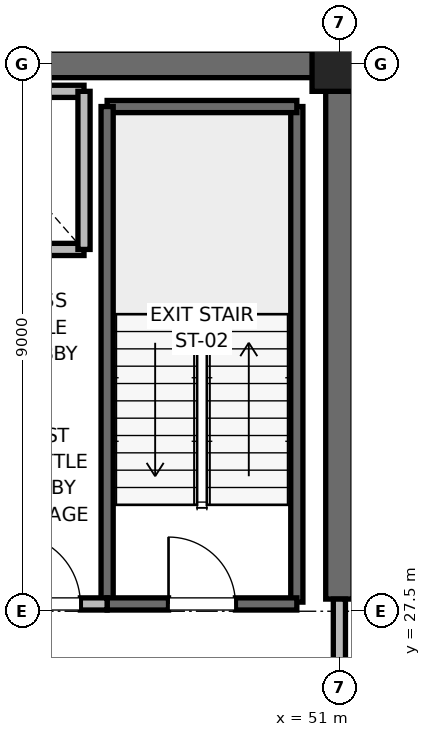
"""IFC4 building model, lengths in metres.
Left out: names, types, materials, properties, quantities, classifications, styles, units other than length and angle.
Written with IfcOpenShell. Run it as: python <this file> out.ifc"""

import sys

from ifc_helpers import new_model, si_unit, direction, frame, frame_2d, origin, origin_2d, place, context, subcontext, project, spatial, rectangle, extrude, element, fill, save


model = new_model("IFC4")
c1 = context("Model", 3, precision=1e-05, world=origin(), true_north=direction((0.0, 1.0)))
c2 = subcontext(c1, "Body", "Model", "MODEL_VIEW")
j1 = project(units=[si_unit("LENGTHUNIT", "METRE"), si_unit("PLANEANGLEUNIT", "RADIAN")], contexts=[c1])
p1 = place(None, origin())
s1 = spatial("IfcSite", under=j1, at=p1, CompositionType="ELEMENT")
p2 = place(p1, origin())
s2 = spatial("IfcBuilding", under=s1, at=p2, CompositionType="ELEMENT")
p3 = place(p2, frame((0.0, 0.0, 267.2)))
s3 = spatial("IfcBuildingStorey", under=s2, at=p3, CompositionType="ELEMENT", Elevation=267.2)
p4 = place(p3, frame((51.0, 36.5, 0.0), z_axis=(0.0, 0.0, 1.0), x_axis=(1.0, 0.0, 0.0)))
e1 = element("IfcColumn", 1, at=p4, inside=s3, PredefinedType="PILASTER", context=c2, shape_type="SweptSolid", body=[
    extrude(rectangle(XDim=0.9, YDim=0.9, at=origin_2d()), origin(), (0.0, 0.0, 1.0), 4.0),
])
p5 = place(p3, frame((45.2, 36.5, 0.0), z_axis=(0.0, 0.0, 1.0), x_axis=(1.0, 0.0, 0.0)))
e2 = element("IfcWall", 2, at=p5, inside=s3, PredefinedType="SHEAR", context=c2, shape_type="SweptSolid", body=[
    extrude(rectangle(XDim=5.8, YDim=0.45, at=frame_2d((2.9, 0.0))), origin(), (0.0, 0.0, 1.0), 3.785),
])
p6 = place(p3, frame((51.0, 27.7, 0.0), z_axis=(0.0, 0.0, 1.0), x_axis=(0.0, 1.0, 0.0)))
e3 = element("IfcWall", 3, at=p6, inside=s3, PredefinedType="SHEAR", context=c2, shape_type="SweptSolid", body=[
    extrude(rectangle(XDim=8.8, YDim=0.45, at=frame_2d((4.4, 0.0))), origin(), (0.0, 0.0, 1.0), 3.785),
])
p7 = place(p3, frame((50.3, 27.65, 0.0), z_axis=(0.0, 0.0, 1.0), x_axis=(0.0, 1.0, 0.0)))
e4 = element("IfcWall", 4, at=p7, inside=s3, PredefinedType="SOLIDWALL", context=c2, shape_type="SweptSolid", body=[
    extrude(rectangle(XDim=8.15, YDim=0.2, at=frame_2d((4.075, 0.0))), origin(), (0.0, 0.0, 1.0), 3.785),
])
p8 = place(p3, frame((47.18, 35.8, 0.0), z_axis=(0.0, 0.0, 1.0), x_axis=(1.0, 0.0, 0.0)))
e5 = element("IfcWall", 5, at=p8, inside=s3, PredefinedType="SOLIDWALL", context=c2, shape_type="SweptSolid", body=[
    extrude(rectangle(XDim=3.12, YDim=0.2, at=frame_2d((1.56, 0.0))), origin(), (0.0, 0.0, 1.0), 3.785),
])
p9 = place(p3, frame((47.18, 27.62, 0.0), z_axis=(0.0, 0.0, 1.0), x_axis=(0.0, 1.0, 0.0)))
e6 = element("IfcWall", 6, at=p9, inside=s3, PredefinedType="SOLIDWALL", context=c2, shape_type="SweptSolid", body=[
    extrude(rectangle(XDim=8.18, YDim=0.2, at=frame_2d((4.09, 0.0))), origin(), (0.0, 0.0, 1.0), 3.785),
])
p10 = place(p3, frame((47.18, 27.62, 0.0), z_axis=(0.0, 0.0, 1.0), x_axis=(1.0, 0.0, 0.0)))
e7 = element("IfcWall", 7, at=p10, inside=s3, PredefinedType="SOLIDWALL", context=c2, shape_type="SweptSolid", body=[
    extrude(rectangle(XDim=3.12, YDim=0.2, at=frame_2d((1.56, 0.0))), origin(), (0.0, 0.0, 1.0), 3.785),
])
p11 = place(p10, frame((1.01, 0.0, 0.0)))
e8 = element("IfcOpeningElement", 8, at=p11, cuts=e7, PredefinedType="OPENING", context=c2, shape_type="SweptSolid", body=[
    extrude(rectangle(XDim=1.1, YDim=2.15, at=frame_2d((0.55, 1.075))), frame((0.0, 0.1, 0.0), z_axis=(0.0, -1.0, 0.0), x_axis=(1.0, 0.0, 0.0)), (0.0, 0.0, 1.0), 0.2),
])
p12 = place(p3, frame((45.15, 27.62, 0.0), z_axis=(0.0, 0.0, 1.0), x_axis=(1.0, 0.0, 0.0)))
e9 = element("IfcWall", 9, at=p12, inside=s3, PredefinedType="PARTITIONING", context=c2, shape_type="SweptSolid", body=[
    extrude(rectangle(XDim=2.03, YDim=0.2, at=frame_2d((1.015, 0.0))), origin(), (0.0, 0.0, 1.0), 3.785),
])
p13 = place(p12, frame((0.44, 0.0, 0.0)))
e10 = element("IfcOpeningElement", 10, at=p13, cuts=e9, PredefinedType="OPENING", context=c2, shape_type="SweptSolid", body=[
    extrude(rectangle(XDim=1.15, YDim=2.2, at=frame_2d((0.575, 1.1))), frame((0.0, 0.1, 0.0), z_axis=(0.0, -1.0, 0.0), x_axis=(1.0, 0.0, 0.0)), (0.0, 0.0, 1.0), 0.2),
])
p14 = place(p3, frame((51.0, 24.3, 0.0), z_axis=(0.0, 0.0, 1.0), x_axis=(0.0, 1.0, 0.0)))
e11 = element("IfcWall", 11, at=p14, inside=s3, PredefinedType="PARTITIONING", context=c2, shape_type="SweptSolid", body=[
    extrude(rectangle(XDim=3.4, YDim=0.2, at=frame_2d((1.7, 0.0))), origin(), (0.0, 0.0, 1.0), 2.865),
])
p15 = place(p14, frame((1.125, 0.0, 0.0)))
e12 = element("IfcOpeningElement", 12, at=p15, cuts=e11, PredefinedType="OPENING", context=c2, shape_type="SweptSolid", body=[
    extrude(rectangle(XDim=1.15, YDim=2.2, at=frame_2d((0.575, 1.1))), frame((0.0, 0.1, 0.0), z_axis=(0.0, -1.0, 0.0), x_axis=(1.0, 0.0, 0.0)), (0.0, 0.0, 1.0), 0.2),
])
p16 = place(p3, frame((44.5, 33.45, 0.0), z_axis=(0.0, 0.0, 1.0), x_axis=(1.0, 0.0, 0.0)))
e13 = element("IfcWall", 13, at=p16, inside=s3, PredefinedType="SOLIDWALL", context=c2, shape_type="SweptSolid", body=[
    extrude(rectangle(XDim=2.3, YDim=0.2, at=frame_2d((1.15, 0.0))), origin(), (0.0, 0.0, 1.0), 3.785),
])
p17 = place(p3, frame((46.8, 36.05, 0.0), z_axis=(0.0, 0.0, 1.0), x_axis=(-1.0, 0.0, 0.0)))
e14 = element("IfcWall", 14, at=p17, inside=s3, PredefinedType="SOLIDWALL", context=c2, shape_type="SweptSolid", body=[
    extrude(rectangle(XDim=2.3, YDim=0.2, at=frame_2d((1.15, 0.0))), origin(), (0.0, 0.0, 1.0), 2.865),
])
p18 = place(p3, frame((46.8, 33.45, 0.0), z_axis=(0.0, 0.0, 1.0), x_axis=(0.0, 1.0, 0.0)))
e15 = element("IfcWall", 15, at=p18, inside=s3, PredefinedType="SOLIDWALL", context=c2, shape_type="SweptSolid", body=[
    extrude(rectangle(XDim=2.6, YDim=0.2, at=frame_2d((1.3, 0.0))), origin(), (0.0, 0.0, 1.0), 3.785),
])
p19 = place(p11, origin())
e16 = element("IfcDoor", 16, at=p19, inside=s3, OperationType="SINGLE_SWING_LEFT", PredefinedType="DOOR", context=c2, shape_type="SweptSolid", body=[
    extrude(rectangle(XDim=1.1, YDim=2.15, at=frame_2d((0.55, 1.075))), frame((0.0, 0.025, 0.0), z_axis=(0.0, -1.0, 0.0), x_axis=(1.0, 0.0, 0.0)), (0.0, 0.0, 1.0), 0.05),
])
fill(e8, e16)
p20 = place(p13, origin())
e17 = element("IfcDoor", 17, at=p20, inside=s3, OperationType="SINGLE_SWING_LEFT", PredefinedType="DOOR", context=c2, shape_type="SweptSolid", body=[
    extrude(rectangle(XDim=1.15, YDim=2.2, at=frame_2d((0.575, 1.1))), frame((0.0, 0.025, 0.0), z_axis=(0.0, -1.0, 0.0), x_axis=(1.0, 0.0, 0.0)), (0.0, 0.0, 1.0), 0.05),
])
fill(e10, e17)
save(model, sys.argv[1])
